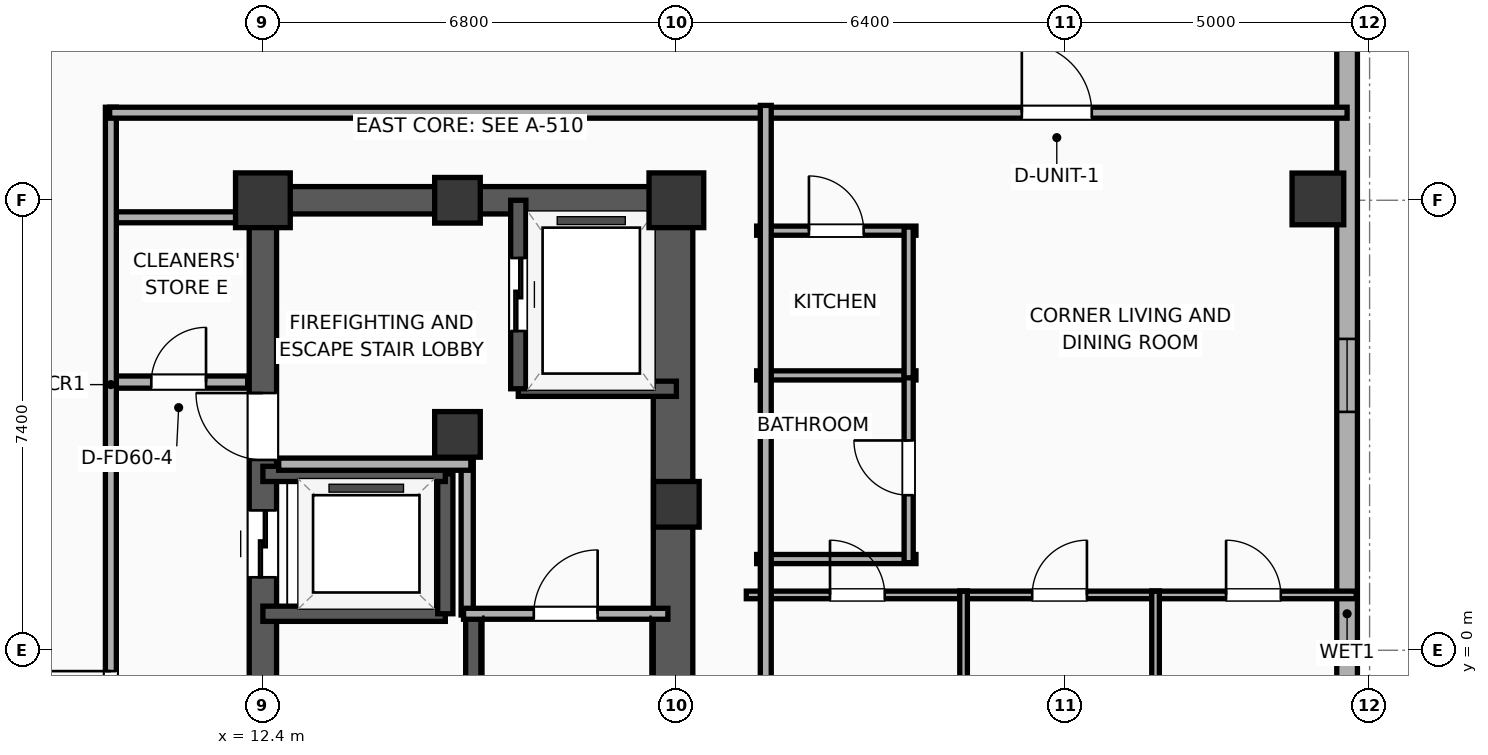
"""IFC4 building model, lengths in metres.
Left out: names, types, materials, properties, quantities, classifications, styles, units other than length and angle.
Written with IfcOpenShell. Run it as: python <this file> out.ifc"""

import sys

from ifc_helpers import new_model, si_unit, direction, frame, frame_2d, origin, origin_2d, place, context, subcontext, project, spatial, rectangle, hollow_rectangle, extrude, element, fill, save


model = new_model("IFC4")
c1 = context("Model", 3, precision=1e-05, world=origin(), true_north=direction((0.0, 1.0)))
c2 = subcontext(c1, "Body", "Model", "MODEL_VIEW")
j1 = project(units=[si_unit("LENGTHUNIT", "METRE"), si_unit("PLANEANGLEUNIT", "RADIAN")], contexts=[c1])
p1 = place(None, origin())
s1 = spatial("IfcSite", under=j1, at=p1, CompositionType="ELEMENT")
p2 = place(p1, origin())
s2 = spatial("IfcBuilding", under=s1, at=p2, CompositionType="ELEMENT")
p3 = place(p2, frame((0.0, 0.0, 239.2)))
s3 = spatial("IfcBuildingStorey", under=s2, at=p3, CompositionType="ELEMENT", Elevation=239.2)
p4 = place(p3, frame((15.6, 3.55, 0.0), z_axis=(0.0, 0.0, 1.0), x_axis=(1.0, 0.0, 0.0)))
e1 = element("IfcColumn", 1, at=p4, inside=s3, PredefinedType="COLUMN", context=c2, shape_type="SweptSolid", body=[
    extrude(rectangle(XDim=0.75, YDim=0.75, at=origin_2d()), origin(), (0.0, 0.0, 1.0), 3.9),
])
p5 = place(p3, frame((12.4, 7.4, 0.0), z_axis=(0.0, 0.0, 1.0), x_axis=(1.0, 0.0, 0.0)))
e2 = element("IfcColumn", 2, at=p5, inside=s3, PredefinedType="COLUMN", context=c2, shape_type="SweptSolid", body=[
    extrude(rectangle(XDim=0.9, YDim=0.9, at=origin_2d()), origin(), (0.0, 0.0, 1.0), 3.9),
])
for number, where, z_axis, x_axis in (
    (3, (15.6, 7.4, 0.0), (0.0, 0.0, 1.0), (1.0, 0.0, 0.0)),
    (4, (19.2, 2.4, 0.0), (0.0, 0.0, 1.0), (1.0, 0.0, 0.0)),
):
    element("IfcColumn", number, at=place(p3, frame(where, z_axis=z_axis, x_axis=x_axis)), inside=s3, PredefinedType="COLUMN", context=c2, shape_type="SweptSolid", body=[
        extrude(rectangle(XDim=0.75, YDim=0.75, at=origin_2d()), origin(), (0.0, 0.0, 1.0), 3.9),
    ])
p6 = place(p3, frame((19.2, 7.4, 0.0), z_axis=(0.0, 0.0, 1.0), x_axis=(1.0, 0.0, 0.0)))
e5 = element("IfcColumn", 5, at=p6, inside=s3, PredefinedType="COLUMN", context=c2, shape_type="SweptSolid", body=[
    extrude(rectangle(XDim=0.9, YDim=0.9, at=origin_2d()), origin(), (0.0, 0.0, 1.0), 3.9),
])
p7 = place(p3, frame((12.175, 7.4, 0.0), z_axis=(0.0, 0.0, 1.0), x_axis=(1.0, 0.0, 0.0)))
e6 = element("IfcWall", 6, at=p7, inside=s3, PredefinedType="SHEAR", context=c2, shape_type="SweptSolid", body=[
    extrude(rectangle(XDim=7.25, YDim=0.45, at=frame_2d((3.625, 0.0))), origin(), (0.0, 0.0, 1.0), 3.65),
])
p8 = place(p3, frame((12.4, -7.4, 0.0), z_axis=(0.0, 0.0, 1.0), x_axis=(0.0, 1.0, 0.0)))
e7 = element("IfcWall", 7, at=p8, inside=s3, PredefinedType="SHEAR", context=c2, shape_type="SweptSolid", body=[
    extrude(rectangle(XDim=14.8, YDim=0.45, at=frame_2d((7.4, 0.0))), origin(), (0.0, 0.0, 1.0), 3.65),
])
p9 = place(p8, frame((8.6, 0.0, 0.0)))
e8 = element("IfcOpeningElement", 8, at=p9, cuts=e7, PredefinedType="OPENING", context=c2, shape_type="SweptSolid", body=[
    extrude(rectangle(XDim=1.1, YDim=2.05, at=frame_2d((0.55, 1.025))), frame((0.0, 0.235, 0.0), z_axis=(0.0, -1.0, 0.0), x_axis=(1.0, 0.0, 0.0)), (0.0, 0.0, 1.0), 0.47),
])
p10 = place(p8, frame((10.53, 0.0, 0.0)))
e9 = element("IfcOpeningElement", 9, at=p10, cuts=e7, PredefinedType="OPENING", context=c2, shape_type="SweptSolid", body=[
    extrude(rectangle(XDim=1.1, YDim=2.05, at=frame_2d((0.55, 1.025))), frame((0.0, 0.235, 0.0), z_axis=(0.0, -1.0, 0.0), x_axis=(1.0, 0.0, 0.0)), (0.0, 0.0, 1.0), 0.47),
])
p11 = place(p8, frame((3.55, 0.0, 0.0)))
e10 = element("IfcOpeningElement", 10, at=p11, cuts=e7, PredefinedType="OPENING", context=c2, shape_type="SweptSolid", body=[
    extrude(rectangle(XDim=0.9, YDim=2.05, at=frame_2d((0.45, 1.025))), frame((0.0, 0.235, 0.0), z_axis=(0.0, -1.0, 0.0), x_axis=(1.0, 0.0, 0.0)), (0.0, 0.0, 1.0), 0.47),
])
p12 = place(p3, frame((19.145, -7.4, 0.0), z_axis=(0.0, 0.0, 1.0), x_axis=(0.0, 1.0, 0.0)))
e11 = element("IfcWall", 11, at=p12, inside=s3, PredefinedType="SHEAR", context=c2, shape_type="SweptSolid", body=[
    extrude(rectangle(XDim=14.8, YDim=0.65, at=frame_2d((7.4, 0.0))), origin(), (0.0, 0.0, 1.0), 3.65),
])
p13 = place(p3, frame((15.86, -7.085, 0.0), z_axis=(0.0, 0.0, 1.0), x_axis=(0.0, 1.0, 0.0)))
e12 = element("IfcWall", 12, at=p13, inside=s3, PredefinedType="SOLIDWALL", context=c2, shape_type="SweptSolid", body=[
    extrude(rectangle(XDim=7.685, YDim=0.25, at=frame_2d((3.843, 0.0))), origin(), (0.0, 0.0, 1.0), 3.65),
])
p14 = place(p3, frame((29.75, 7.422, 0.0), z_axis=(0.0, 0.0, 1.0), x_axis=(1.0, 0.0, 0.0)))
e13 = element("IfcColumn", 13, at=p14, inside=s3, PredefinedType="COLUMN", context=c2, shape_type="SweptSolid", body=[
    extrude(hollow_rectangle(XDim=0.85, YDim=0.85, WallThickness=0.028, at=origin_2d()), origin(), (0.0, 0.0, 1.0), 3.9),
])
p15 = place(p3, frame((30.23, 16.583, 0.0), z_axis=(0.0, 0.0, 1.0), x_axis=(0.0, -1.0, 0.0)))
e14 = element("IfcWall", 14, at=p15, inside=s3, PredefinedType="ELEMENTEDWALL", context=c2, shape_type="SweptSolid", body=[
    extrude(rectangle(XDim=31.967, YDim=0.34, at=frame_2d((15.983, 0.0))), origin(), (0.0, 0.0, 1.0), 3.65),
])
p16 = place(p15, frame((29.924, 0.0, 0.75)))
e15 = element("IfcOpeningElement", 15, at=p16, cuts=e14, PredefinedType="OPENING", context=c2, shape_type="SweptSolid", body=[
    extrude(rectangle(XDim=1.2, YDim=2.05, at=frame_2d((0.6, 1.025))), frame((0.0, 0.18, 0.0), z_axis=(0.0, -1.0, 0.0), x_axis=(1.0, 0.0, 0.0)), (0.0, 0.0, 1.0), 0.36),
])
p17 = place(p15, frame((11.463, 0.0, 0.75)))
e16 = element("IfcOpeningElement", 16, at=p17, cuts=e14, PredefinedType="OPENING", context=c2, shape_type="SweptSolid", body=[
    extrude(rectangle(XDim=1.2, YDim=2.05, at=frame_2d((0.6, 1.025))), frame((0.0, 0.18, 0.0), z_axis=(0.0, -1.0, 0.0), x_axis=(1.0, 0.0, 0.0)), (0.0, 0.0, 1.0), 0.36),
])
p18 = place(p15, frame((20.363, 0.0, 0.75)))
e17 = element("IfcOpeningElement", 17, at=p18, cuts=e14, PredefinedType="OPENING", context=c2, shape_type="SweptSolid", body=[
    extrude(rectangle(XDim=1.2, YDim=2.05, at=frame_2d((0.6, 1.025))), frame((0.0, 0.18, 0.0), z_axis=(0.0, -1.0, 0.0), x_axis=(1.0, 0.0, 0.0)), (0.0, 0.0, 1.0), 0.36),
])
p19 = place(p3, frame((16.6, 4.3, 0.0), z_axis=(0.0, 0.0, 1.0), x_axis=(1.0, 0.0, 0.0)))
e18 = element("IfcWall", 18, at=p19, inside=s3, PredefinedType="SOLIDWALL", context=c2, shape_type="SweptSolid", body=[
    extrude(rectangle(XDim=2.6, YDim=0.25, at=frame_2d((1.3, 0.0))), origin(), (0.0, 0.0, 1.0), 3.65),
])
p20 = place(p3, frame((16.6, 7.4, 0.0), z_axis=(0.0, 0.0, 1.0), x_axis=(0.0, -1.0, 0.0)))
e19 = element("IfcWall", 19, at=p20, inside=s3, PredefinedType="SOLIDWALL", context=c2, shape_type="SweptSolid", body=[
    extrude(rectangle(XDim=3.1, YDim=0.25, at=frame_2d((1.55, 0.0))), origin(), (0.0, 0.0, 1.0), 3.65),
])
p21 = place(p20, frame((0.95, 0.0, 0.0)))
e20 = element("IfcOpeningElement", 20, at=p21, cuts=e19, PredefinedType="OPENING", context=c2, shape_type="SweptSolid", body=[
    extrude(rectangle(XDim=1.2, YDim=2.05, at=frame_2d((0.6, 1.025))), frame((0.0, 0.135, 0.0), z_axis=(0.0, -1.0, 0.0), x_axis=(1.0, 0.0, 0.0)), (0.0, 0.0, 1.0), 0.27),
])
p22 = place(p3, frame((12.4, 0.6, 0.0), z_axis=(0.0, 0.0, 1.0), x_axis=(1.0, 0.0, 0.0)))
e21 = element("IfcWall", 21, at=p22, inside=s3, PredefinedType="SOLIDWALL", context=c2, shape_type="SweptSolid", body=[
    extrude(rectangle(XDim=3.0, YDim=0.25, at=frame_2d((1.5, 0.0))), origin(), (0.0, 0.0, 1.0), 3.65),
])
p23 = place(p3, frame((15.4, 0.6, 0.0), z_axis=(0.0, 0.0, 1.0), x_axis=(0.0, 1.0, 0.0)))
e22 = element("IfcWall", 22, at=p23, inside=s3, PredefinedType="SOLIDWALL", context=c2, shape_type="SweptSolid", body=[
    extrude(rectangle(XDim=2.3, YDim=0.25, at=frame_2d((1.15, 0.0))), origin(), (0.0, 0.0, 1.0), 3.65),
])
p24 = place(p3, frame((15.4, 2.9, 0.0), z_axis=(0.0, 0.0, 1.0), x_axis=(-1.0, 0.0, 0.0)))
e23 = element("IfcWall", 23, at=p24, inside=s3, PredefinedType="SOLIDWALL", context=c2, shape_type="SweptSolid", body=[
    extrude(rectangle(XDim=3.0, YDim=0.25, at=frame_2d((1.5, 0.0))), origin(), (0.0, 0.0, 1.0), 3.65),
])
p25 = place(p3, frame((15.76, 0.58, 0.0), z_axis=(0.0, 0.0, 1.0), x_axis=(0.0, 1.0, 0.0)))
e24 = element("IfcWall", 24, at=p25, inside=s3, PredefinedType="PARTITIONING", context=c2, shape_type="SweptSolid", body=[
    extrude(rectangle(XDim=2.52, YDim=0.2, at=frame_2d((1.26, 0.0))), origin(), (0.0, 0.0, 1.0), 3.65),
])
p26 = place(p3, frame((12.66, 3.06, 0.0), z_axis=(0.0, 0.0, 1.0), x_axis=(1.0, 0.0, 0.0)))
e25 = element("IfcWall", 25, at=p26, inside=s3, PredefinedType="PARTITIONING", context=c2, shape_type="SweptSolid", body=[
    extrude(rectangle(XDim=3.16, YDim=0.2, at=frame_2d((1.58, 0.0))), origin(), (0.0, 0.0, 1.0), 3.65),
])
p27 = place(p3, frame((15.7, 0.6, 0.0), z_axis=(0.0, 0.0, 1.0), x_axis=(1.0, 0.0, 0.0)))
e26 = element("IfcWall", 26, at=p27, inside=s3, PredefinedType="PARTITIONING", context=c2, shape_type="SweptSolid", body=[
    extrude(rectangle(XDim=3.36, YDim=0.18, at=frame_2d((1.68, 0.0))), origin(), (0.0, 0.0, 1.0), 3.65),
])
p28 = place(p27, frame((1.155, 0.0, 0.0)))
e27 = element("IfcOpeningElement", 27, at=p28, cuts=e26, PredefinedType="OPENING", context=c2, shape_type="SweptSolid", body=[
    extrude(rectangle(XDim=1.05, YDim=2.05, at=frame_2d((0.525, 1.025))), frame((0.0, 0.1, 0.0), z_axis=(0.0, -1.0, 0.0), x_axis=(1.0, 0.0, 0.0)), (0.0, 0.0, 1.0), 0.2),
])
p29 = place(p3, frame((9.88, 4.41, 0.0), z_axis=(0.0, 0.0, 1.0), x_axis=(1.0, 0.0, 0.0)))
e28 = element("IfcWall", 28, at=p29, inside=s3, PredefinedType="PARTITIONING", context=c2, shape_type="SweptSolid", body=[
    extrude(rectangle(XDim=2.27, YDim=0.2, at=frame_2d((1.135, 0.0))), origin(), (0.0, 0.0, 1.0), 3.65),
])
p30 = place(p29, frame((0.685, 0.0, 0.0)))
e29 = element("IfcOpeningElement", 29, at=p30, cuts=e28, PredefinedType="OPENING", context=c2, shape_type="SweptSolid", body=[
    extrude(rectangle(XDim=0.9, YDim=2.05, at=frame_2d((0.45, 1.025))), frame((0.0, 0.11, 0.0), z_axis=(0.0, -1.0, 0.0), x_axis=(1.0, 0.0, 0.0)), (0.0, 0.0, 1.0), 0.22),
])
p31 = place(p3, frame((9.88, 7.12, 0.0), z_axis=(0.0, 0.0, 1.0), x_axis=(1.0, 0.0, 0.0)))
e30 = element("IfcWall", 30, at=p31, inside=s3, PredefinedType="PARTITIONING", context=c2, shape_type="SweptSolid", body=[
    extrude(rectangle(XDim=2.27, YDim=0.18, at=frame_2d((1.135, 0.0))), origin(), (0.0, 0.0, 1.0), 3.65),
])
p32 = place(p3, frame((9.9, -8.93, 0.0), z_axis=(0.0, 0.0, 1.0), x_axis=(0.0, 1.0, 0.0)))
e31 = element("IfcWall", 31, at=p32, inside=s3, PredefinedType="PARTITIONING", context=c2, shape_type="SweptSolid", body=[
    extrude(rectangle(XDim=17.86, YDim=0.18, at=frame_2d((8.93, 0.0))), origin(), (0.0, 0.0, 1.0), 3.65),
])
p33 = place(p32, frame((7.487, 0.0, 0.0)))
e32 = element("IfcOpeningElement", 32, at=p33, cuts=e31, PredefinedType="OPENING", context=c2, shape_type="SweptSolid", body=[
    extrude(rectangle(XDim=1.1, YDim=2.05, at=frame_2d((0.55, 1.025))), frame((0.0, 0.1, 0.0), z_axis=(0.0, -1.0, 0.0), x_axis=(1.0, 0.0, 0.0)), (0.0, 0.0, 1.0), 0.2),
])
p34 = place(p3, frame((9.88, 8.84, 0.0), z_axis=(0.0, 0.0, 1.0), x_axis=(1.0, 0.0, 0.0)))
e33 = element("IfcWall", 33, at=p34, inside=s3, PredefinedType="PARTITIONING", context=c2, shape_type="SweptSolid", body=[
    extrude(rectangle(XDim=20.35, YDim=0.18, at=frame_2d((10.175, 0.0))), origin(), (0.0, 0.0, 1.0), 3.65),
])
p35 = place(p34, frame((15.001, 0.0, 0.0)))
e34 = element("IfcOpeningElement", 34, at=p35, cuts=e33, PredefinedType="OPENING", context=c2, shape_type="SweptSolid", body=[
    extrude(rectangle(XDim=1.15, YDim=2.05, at=frame_2d((0.575, 1.025))), frame((0.0, 0.1, 0.0), z_axis=(0.0, -1.0, 0.0), x_axis=(1.0, 0.0, 0.0)), (0.0, 0.0, 1.0), 0.2),
])
p36 = place(p3, frame((20.52, 6.9, 0.0), z_axis=(0.0, 0.0, 1.0), x_axis=(1.0, 0.0, 0.0)))
e35 = element("IfcWall", 35, at=p36, inside=s3, PredefinedType="PLUMBINGWALL", context=c2, shape_type="SweptSolid", body=[
    extrude(rectangle(XDim=2.62, YDim=0.15, at=frame_2d((1.31, 0.0))), origin(), (0.0, 0.0, 1.0), 3.65),
])
p37 = place(p36, frame((0.86, 0.0, 0.0)))
e36 = element("IfcOpeningElement", 36, at=p37, cuts=e35, PredefinedType="OPENING", context=c2, shape_type="SweptSolid", body=[
    extrude(rectangle(XDim=0.9, YDim=2.05, at=frame_2d((0.45, 1.025))), frame((0.0, 0.085, 0.0), z_axis=(0.0, -1.0, 0.0), x_axis=(1.0, 0.0, 0.0)), (0.0, 0.0, 1.0), 0.17),
])
for number, where, z_axis, x_axis in (
    (37, (20.52, 4.52, 0.0), (0.0, 0.0, 1.0), (1.0, 0.0, 0.0)),
    (38, (20.52, 1.5, 0.0), (0.0, 0.0, 1.0), (1.0, 0.0, 0.0)),
):
    element("IfcWall", number, at=place(p3, frame(where, z_axis=z_axis, x_axis=x_axis)), inside=s3, PredefinedType="PLUMBINGWALL", context=c2, shape_type="SweptSolid", body=[
        extrude(rectangle(XDim=2.62, YDim=0.15, at=frame_2d((1.31, 0.0))), origin(), (0.0, 0.0, 1.0), 3.65),
    ])
p38 = place(p3, frame((23.02, 1.44, 0.0), z_axis=(0.0, 0.0, 1.0), x_axis=(0.0, 1.0, 0.0)))
e39 = element("IfcWall", 39, at=p38, inside=s3, PredefinedType="PLUMBINGWALL", context=c2, shape_type="SweptSolid", body=[
    extrude(rectangle(XDim=3.12, YDim=0.15, at=frame_2d((1.56, 0.0))), origin(), (0.0, 0.0, 1.0), 3.65),
])
p39 = place(p38, frame((1.11, 0.0, 0.0)))
e40 = element("IfcOpeningElement", 40, at=p39, cuts=e39, PredefinedType="OPENING", context=c2, shape_type="SweptSolid", body=[
    extrude(rectangle(XDim=0.9, YDim=2.05, at=frame_2d((0.45, 1.025))), frame((0.0, 0.085, 0.0), z_axis=(0.0, -1.0, 0.0), x_axis=(1.0, 0.0, 0.0)), (0.0, 0.0, 1.0), 0.17),
])
p40 = place(p3, frame((23.02, 4.48, 0.0), z_axis=(0.0, 0.0, 1.0), x_axis=(0.0, 1.0, 0.0)))
e41 = element("IfcWall", 41, at=p40, inside=s3, PredefinedType="PLUMBINGWALL", context=c2, shape_type="SweptSolid", body=[
    extrude(rectangle(XDim=2.48, YDim=0.15, at=frame_2d((1.24, 0.0))), origin(), (0.0, 0.0, 1.0), 3.65),
])
p41 = place(p3, frame((20.35, 0.91, 0.0), z_axis=(0.0, 0.0, 1.0), x_axis=(1.0, 0.0, 0.0)))
e42 = element("IfcWall", 42, at=p41, inside=s3, PredefinedType="PARTITIONING", context=c2, shape_type="SweptSolid", body=[
    extrude(rectangle(XDim=3.635, YDim=0.125, at=frame_2d((1.818, 0.0))), origin(), (0.0, 0.0, 1.0), 3.65),
])
p42 = place(p41, frame((1.376, 0.0, 0.0)))
e43 = element("IfcOpeningElement", 43, at=p42, cuts=e42, PredefinedType="OPENING", context=c2, shape_type="SweptSolid", body=[
    extrude(rectangle(XDim=0.9, YDim=2.05, at=frame_2d((0.45, 1.025))), frame((0.0, 0.073, 0.0), z_axis=(0.0, -1.0, 0.0), x_axis=(1.0, 0.0, 0.0)), (0.0, 0.0, 1.0), 0.145),
])
p43 = place(p3, frame((23.861, 0.91, 0.0), z_axis=(0.0, 0.0, 1.0), x_axis=(1.0, 0.0, 0.0)))
e44 = element("IfcWall", 44, at=p43, inside=s3, PredefinedType="PARTITIONING", context=c2, shape_type="SweptSolid", body=[
    extrude(rectangle(XDim=3.282, YDim=0.125, at=frame_2d((1.641, 0.0))), origin(), (0.0, 0.0, 1.0), 3.65),
])
p44 = place(p43, frame((1.191, 0.0, 0.0)))
e45 = element("IfcOpeningElement", 45, at=p44, cuts=e44, PredefinedType="OPENING", context=c2, shape_type="SweptSolid", body=[
    extrude(rectangle(XDim=0.9, YDim=2.05, at=frame_2d((0.45, 1.025))), frame((0.0, 0.073, 0.0), z_axis=(0.0, -1.0, 0.0), x_axis=(1.0, 0.0, 0.0)), (0.0, 0.0, 1.0), 0.145),
])
p45 = place(p3, frame((27.018, 0.91, 0.0), z_axis=(0.0, 0.0, 1.0), x_axis=(1.0, 0.0, 0.0)))
e46 = element("IfcWall", 46, at=p45, inside=s3, PredefinedType="PARTITIONING", context=c2, shape_type="SweptSolid", body=[
    extrude(rectangle(XDim=3.362, YDim=0.125, at=frame_2d((1.681, 0.0))), origin(), (0.0, 0.0, 1.0), 3.65),
])
p46 = place(p45, frame((1.222, 0.0, 0.0)))
e47 = element("IfcOpeningElement", 47, at=p46, cuts=e46, PredefinedType="OPENING", context=c2, shape_type="SweptSolid", body=[
    extrude(rectangle(XDim=0.9, YDim=2.05, at=frame_2d((0.45, 1.025))), frame((0.0, 0.073, 0.0), z_axis=(0.0, -1.0, 0.0), x_axis=(1.0, 0.0, 0.0)), (0.0, 0.0, 1.0), 0.145),
])
for number, where, z_axis, x_axis in (
    (48, (27.08, -9.16, 0.0), (0.0, 0.0, 1.0), (0.0, 1.0, 0.0)),
    (49, (23.923, -9.16, 0.0), (0.0, 0.0, 1.0), (0.0, 1.0, 0.0)),
):
    element("IfcWall", number, at=place(p3, frame(where, z_axis=z_axis, x_axis=x_axis)), inside=s3, PredefinedType="PARTITIONING", context=c2, shape_type="SweptSolid", body=[
        extrude(rectangle(XDim=10.13, YDim=0.125, at=frame_2d((5.065, 0.0))), origin(), (0.0, 0.0, 1.0), 3.65),
    ])
p47 = place(p3, frame((20.67, -8.96, 0.0), z_axis=(0.0, 0.0, 1.0), x_axis=(0.0, 1.0, 0.0)))
e50 = element("IfcWall", 50, at=p47, inside=s3, PredefinedType="PARTITIONING", context=c2, shape_type="SweptSolid", body=[
    extrude(rectangle(XDim=17.92, YDim=0.18, at=frame_2d((8.96, 0.0))), origin(), (0.0, 0.0, 1.0), 3.65),
])
p48 = place(p17, origin())
e51 = element("IfcWindow", 51, at=p48, inside=s3, PartitioningType="SINGLE_PANEL", PredefinedType="WINDOW", context=c2, shape_type="SweptSolid", body=[
    extrude(rectangle(XDim=1.2, YDim=2.05, at=frame_2d((0.6, 1.025))), frame((0.0, 0.03, 0.0), z_axis=(0.0, -1.0, 0.0), x_axis=(1.0, 0.0, 0.0)), (0.0, 0.0, 1.0), 0.06),
])
fill(e16, e51)
p49 = place(p21, origin())
e52 = element("IfcDoor", 52, at=p49, inside=s3, OperationType="SLIDING_TO_LEFT", PredefinedType="DOOR", context=c2, shape_type="SweptSolid", body=[
    extrude(rectangle(XDim=1.2, YDim=2.05, at=frame_2d((0.6, 1.025))), frame((0.0, 0.025, 0.0), z_axis=(0.0, -1.0, 0.0), x_axis=(1.0, 0.0, 0.0)), (0.0, 0.0, 1.0), 0.05),
])
fill(e20, e52)
p50 = place(p9, origin())
e53 = element("IfcDoor", 53, at=p50, inside=s3, OperationType="SLIDING_TO_LEFT", PredefinedType="DOOR", context=c2, shape_type="SweptSolid", body=[
    extrude(rectangle(XDim=1.1, YDim=2.05, at=frame_2d((0.55, 1.025))), frame((0.0, 0.025, 0.0), z_axis=(0.0, -1.0, 0.0), x_axis=(1.0, 0.0, 0.0)), (0.0, 0.0, 1.0), 0.05),
])
fill(e8, e53)
p51 = place(p28, origin())
e54 = element("IfcDoor", 54, at=p51, inside=s3, OperationType="SINGLE_SWING_RIGHT", PredefinedType="DOOR", context=c2, shape_type="SweptSolid", body=[
    extrude(rectangle(XDim=1.05, YDim=2.05, at=frame_2d((0.525, 1.025))), frame((0.0, 0.025, 0.0), z_axis=(0.0, -1.0, 0.0), x_axis=(1.0, 0.0, 0.0)), (0.0, 0.0, 1.0), 0.05),
])
fill(e27, e54)
p52 = place(p30, origin())
e55 = element("IfcDoor", 55, at=p52, inside=s3, OperationType="SINGLE_SWING_RIGHT", PredefinedType="DOOR", context=c2, shape_type="SweptSolid", body=[
    extrude(rectangle(XDim=0.9, YDim=2.05, at=frame_2d((0.45, 1.025))), frame((0.0, 0.025, 0.0), z_axis=(0.0, -1.0, 0.0), x_axis=(1.0, 0.0, 0.0)), (0.0, 0.0, 1.0), 0.05),
])
fill(e29, e55)
p53 = place(p33, origin())
e56 = element("IfcDoor", 56, at=p53, inside=s3, OperationType="SINGLE_SWING_RIGHT", PredefinedType="DOOR", context=c2, shape_type="SweptSolid", body=[
    extrude(rectangle(XDim=1.1, YDim=2.05, at=frame_2d((0.55, 1.025))), frame((0.0, 0.025, 0.0), z_axis=(0.0, -1.0, 0.0), x_axis=(1.0, 0.0, 0.0)), (0.0, 0.0, 1.0), 0.05),
])
fill(e32, e56)
p54 = place(p35, origin())
e57 = element("IfcDoor", 57, at=p54, inside=s3, OperationType="SINGLE_SWING_LEFT", PredefinedType="DOOR", context=c2, shape_type="SweptSolid", body=[
    extrude(rectangle(XDim=1.15, YDim=2.05, at=frame_2d((0.575, 1.025))), frame((0.0, 0.025, 0.0), z_axis=(0.0, -1.0, 0.0), x_axis=(1.0, 0.0, 0.0)), (0.0, 0.0, 1.0), 0.05),
])
fill(e34, e57)
p55 = place(p37, origin())
e58 = element("IfcDoor", 58, at=p55, inside=s3, OperationType="SINGLE_SWING_LEFT", PredefinedType="DOOR", context=c2, shape_type="SweptSolid", body=[
    extrude(rectangle(XDim=0.9, YDim=2.05, at=frame_2d((0.45, 1.025))), frame((0.0, 0.025, 0.0), z_axis=(0.0, -1.0, 0.0), x_axis=(1.0, 0.0, 0.0)), (0.0, 0.0, 1.0), 0.05),
])
fill(e36, e58)
p56 = place(p39, origin())
e59 = element("IfcDoor", 59, at=p56, inside=s3, OperationType="SINGLE_SWING_RIGHT", PredefinedType="DOOR", context=c2, shape_type="SweptSolid", body=[
    extrude(rectangle(XDim=0.9, YDim=2.05, at=frame_2d((0.45, 1.025))), frame((0.0, 0.025, 0.0), z_axis=(0.0, -1.0, 0.0), x_axis=(1.0, 0.0, 0.0)), (0.0, 0.0, 1.0), 0.05),
])
fill(e40, e59)
p57 = place(p42, origin())
e60 = element("IfcDoor", 60, at=p57, inside=s3, OperationType="SINGLE_SWING_LEFT", PredefinedType="DOOR", context=c2, shape_type="SweptSolid", body=[
    extrude(rectangle(XDim=0.9, YDim=2.05, at=frame_2d((0.45, 1.025))), frame((0.0, 0.025, 0.0), z_axis=(0.0, -1.0, 0.0), x_axis=(1.0, 0.0, 0.0)), (0.0, 0.0, 1.0), 0.05),
])
fill(e43, e60)
p58 = place(p44, origin())
e61 = element("IfcDoor", 61, at=p58, inside=s3, OperationType="SINGLE_SWING_RIGHT", PredefinedType="DOOR", context=c2, shape_type="SweptSolid", body=[
    extrude(rectangle(XDim=0.9, YDim=2.05, at=frame_2d((0.45, 1.025))), frame((0.0, 0.025, 0.0), z_axis=(0.0, -1.0, 0.0), x_axis=(1.0, 0.0, 0.0)), (0.0, 0.0, 1.0), 0.05),
])
fill(e45, e61)
p59 = place(p46, origin())
e62 = element("IfcDoor", 62, at=p59, inside=s3, OperationType="SINGLE_SWING_LEFT", PredefinedType="DOOR", context=c2, shape_type="SweptSolid", body=[
    extrude(rectangle(XDim=0.9, YDim=2.05, at=frame_2d((0.45, 1.025))), frame((0.0, 0.025, 0.0), z_axis=(0.0, -1.0, 0.0), x_axis=(1.0, 0.0, 0.0)), (0.0, 0.0, 1.0), 0.05),
])
fill(e47, e62)
p60 = place(p10, origin())
e63 = element("IfcDoor", 63, at=p60, inside=s3, OperationType="SINGLE_SWING_RIGHT", PredefinedType="DOOR", context=c2, shape_type="SweptSolid", body=[
    extrude(rectangle(XDim=1.1, YDim=2.05, at=frame_2d((0.55, 1.025))), frame((0.0, 0.025, 0.0), z_axis=(0.0, -1.0, 0.0), x_axis=(1.0, 0.0, 0.0)), (0.0, 0.0, 1.0), 0.05),
])
fill(e9, e63)
save(model, sys.argv[1])
